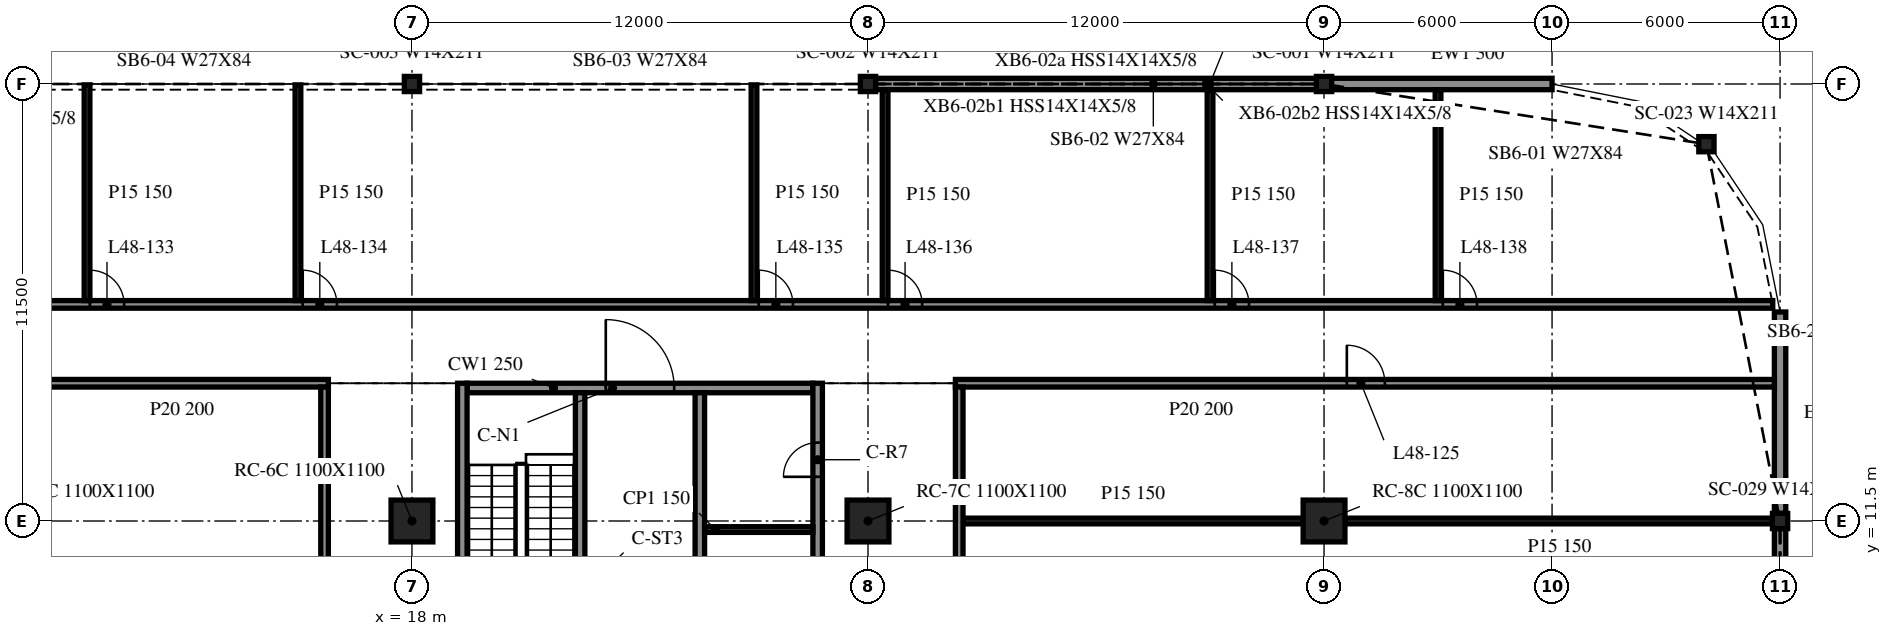
"""IFC4 building model, lengths in metres.
Left out: names, types, materials, properties, quantities, classifications, styles, units other than length and angle.
Written with IfcOpenShell. Run it as: python <this file> out.ifc"""

import sys

from ifc_helpers import new_model, si_unit, direction, frame, frame_2d, origin, origin_2d, place, context, subcontext, project, spatial, rectangle, i_section, extrude, element, fill, save


model = new_model("IFC4")
c1 = context("Model", 3, precision=1e-05, world=origin(), true_north=direction((0.0, 1.0)))
c2 = subcontext(c1, "Body", "Model", "MODEL_VIEW")
j1 = project(units=[si_unit("LENGTHUNIT", "METRE"), si_unit("PLANEANGLEUNIT", "RADIAN")], contexts=[c1])
p1 = place(None, origin())
s1 = spatial("IfcSite", under=j1, at=p1, CompositionType="ELEMENT")
p2 = place(p1, origin())
s2 = spatial("IfcBuilding", under=s1, at=p2, CompositionType="ELEMENT")
p3 = place(p2, frame((0.0, 0.0, 201.5)))
s3 = spatial("IfcBuildingStorey", under=s2, at=p3, CompositionType="ELEMENT", Elevation=201.5)
for number, where, z_axis, x_axis in (
    (1, (18.0, 11.5, -0.34), (0.0, 0.0, 1.0), (1.0, 0.0, 0.0)),
    (2, (30.0, 11.5, -0.34), (0.0, 0.0, 1.0), (1.0, 0.0, 0.0)),
    (3, (42.0, 11.5, -0.34), (0.0, 0.0, 1.0), (1.0, 0.0, 0.0)),
):
    element("IfcColumn", number, at=place(p3, frame(where, z_axis=z_axis, x_axis=x_axis)), inside=s3, PredefinedType="COLUMN", context=c2, shape_type="SweptSolid", body=[
        extrude(rectangle(XDim=1.1, YDim=1.1, at=origin_2d()), origin(), (0.0, 0.0, 1.0), 3.8),
    ])
for number, where, z_axis, x_axis in (
    (4, (52.062, 21.416, -0.34), (0.0, 0.0, 1.0), (1.0, 0.0, 0.0)),
    (5, (42.0, 23.0, -0.34), (0.0, 0.0, 1.0), (1.0, 0.0, 0.0)),
    (6, (30.0, 23.0, -0.34), (0.0, 0.0, 1.0), (1.0, 0.0, 0.0)),
    (7, (18.0, 23.0, -0.34), (0.0, 0.0, 1.0), (1.0, 0.0, 0.0)),
    (8, (54.0, 11.5, -0.34), (0.0, 0.0, 1.0), (1.0, 0.0, 0.0)),
):
    element("IfcColumn", number, at=place(p3, frame(where, z_axis=z_axis, x_axis=x_axis)), inside=s3, PredefinedType="COLUMN", context=c2, shape_type="SweptSolid", body=[
        extrude(i_section(OverallWidth=0.401, OverallDepth=0.399, WebThickness=0.025, FlangeThickness=0.04, at=origin_2d()), origin(), (0.0, 0.0, 1.0), 3.8),
    ])
p4 = place(p3, frame((48.0, 23.0, 0.0), z_axis=(0.0, 0.0, 1.0), x_axis=(-1.0, 0.0, 0.0)))
e9 = element("IfcWall", 9, at=p4, inside=s3, PredefinedType="NOTDEFINED", context=c2, shape_type="SweptSolid", body=[
    extrude(rectangle(XDim=5.988, YDim=0.3, at=frame_2d((2.994, 0.0))), origin(), (0.0, 0.0, 1.0), 2.782),
])
p5 = place(p3, frame((41.988, 23.0, 0.0), z_axis=(0.0, 0.0, 1.0), x_axis=(-1.0, 0.0, 0.0)))
e10 = element("IfcWall", 10, at=p5, inside=s3, PredefinedType="NOTDEFINED", context=c2, shape_type="SweptSolid", body=[
    extrude(rectangle(XDim=11.975, YDim=0.3, at=frame_2d((5.988, 0.0))), origin(), (0.0, 0.0, 1.0), 2.782),
])
p6 = place(p3, frame((54.0, 0.2, 0.0), z_axis=(0.0, 0.0, 1.0), x_axis=(0.0, 1.0, 0.0)))
e11 = element("IfcWall", 11, at=p6, inside=s3, PredefinedType="NOTDEFINED", context=c2, shape_type="SweptSolid", body=[
    extrude(rectangle(XDim=11.1, YDim=0.3, at=frame_2d((5.55, 0.0))), origin(), (0.0, 0.0, 1.0), 2.782),
])
p7 = place(p3, frame((54.0, 11.7, 0.0), z_axis=(0.0, 0.0, 1.0), x_axis=(0.0, 1.0, 0.0)))
e12 = element("IfcWall", 12, at=p7, inside=s3, PredefinedType="NOTDEFINED", context=c2, shape_type="SweptSolid", body=[
    extrude(rectangle(XDim=5.3, YDim=0.3, at=frame_2d((2.65, 0.0))), origin(), (0.0, 0.0, 1.0), 2.782),
])
p8 = place(p3, frame((19.325, 15.125, 0.0), z_axis=(0.0, 0.0, 1.0), x_axis=(0.0, -1.0, 0.0)))
e13 = element("IfcWall", 13, at=p8, inside=s3, PredefinedType="SOLIDWALL", context=c2, shape_type="SweptSolid", body=[
    extrude(rectangle(XDim=24.25, YDim=0.25, at=frame_2d((12.125, 0.0))), origin(), (0.0, 0.0, 1.0), 3.46),
])
p9 = place(p3, frame((28.675, -9.125, 0.0), z_axis=(0.0, 0.0, 1.0), x_axis=(0.0, 1.0, 0.0)))
e14 = element("IfcWall", 14, at=p9, inside=s3, PredefinedType="SOLIDWALL", context=c2, shape_type="SweptSolid", body=[
    extrude(rectangle(XDim=24.25, YDim=0.25, at=frame_2d((12.125, 0.0))), origin(), (0.0, 0.0, 1.0), 3.46),
])
p10 = place(p9, frame((13.075, 0.0, 0.0)))
e15 = element("IfcOpeningElement", 15, at=p10, cuts=e14, PredefinedType="OPENING", context=c2, shape_type="SweptSolid", body=[
    extrude(rectangle(XDim=0.9, YDim=2.1, at=frame_2d((0.45, 1.05))), frame((0.0, 0.135, 0.0), z_axis=(0.0, -1.0, 0.0), x_axis=(1.0, 0.0, 0.0)), (0.0, 0.0, 1.0), 0.27),
])
p11 = place(p9, frame((15.775, 0.0, 0.0)))
e16 = element("IfcOpeningElement", 16, at=p11, cuts=e14, PredefinedType="OPENING", context=c2, shape_type="SweptSolid", body=[
    extrude(rectangle(XDim=0.9, YDim=2.1, at=frame_2d((0.45, 1.05))), frame((0.0, 0.135, 0.0), z_axis=(0.0, -1.0, 0.0), x_axis=(1.0, 0.0, 0.0)), (0.0, 0.0, 1.0), 0.27),
])
p12 = place(p9, frame((18.712, 0.0, 0.0)))
e17 = element("IfcOpeningElement", 17, at=p12, cuts=e14, PredefinedType="OPENING", context=c2, shape_type="SweptSolid", body=[
    extrude(rectangle(XDim=0.9, YDim=2.1, at=frame_2d((0.45, 1.05))), frame((0.0, 0.135, 0.0), z_axis=(0.0, -1.0, 0.0), x_axis=(1.0, 0.0, 0.0)), (0.0, 0.0, 1.0), 0.27),
])
p13 = place(p9, frame((21.788, 0.0, 0.0)))
e18 = element("IfcOpeningElement", 18, at=p13, cuts=e14, PredefinedType="OPENING", context=c2, shape_type="SweptSolid", body=[
    extrude(rectangle(XDim=0.9, YDim=2.1, at=frame_2d((0.45, 1.05))), frame((0.0, 0.135, 0.0), z_axis=(0.0, -1.0, 0.0), x_axis=(1.0, 0.0, 0.0)), (0.0, 0.0, 1.0), 0.27),
])
p14 = place(p3, frame((19.45, 15.0, 0.0), z_axis=(0.0, 0.0, 1.0), x_axis=(1.0, 0.0, 0.0)))
e19 = element("IfcWall", 19, at=p14, inside=s3, PredefinedType="SOLIDWALL", context=c2, shape_type="SweptSolid", body=[
    extrude(rectangle(XDim=9.1, YDim=0.25, at=frame_2d((4.55, 0.0))), origin(), (0.0, 0.0, 1.0), 3.46),
])
p15 = place(p14, frame((3.65, 0.0, 0.0)))
e20 = element("IfcOpeningElement", 20, at=p15, cuts=e19, PredefinedType="OPENING", context=c2, shape_type="SweptSolid", body=[
    extrude(rectangle(XDim=1.8, YDim=2.1, at=frame_2d((0.9, 1.05))), frame((0.0, 0.135, 0.0), z_axis=(0.0, -1.0, 0.0), x_axis=(1.0, 0.0, 0.0)), (0.0, 0.0, 1.0), 0.27),
])
p16 = place(p3, frame((22.425, 14.875, 0.0), z_axis=(0.0, 0.0, 1.0), x_axis=(0.0, -1.0, 0.0)))
e21 = element("IfcWall", 21, at=p16, inside=s3, PredefinedType="SOLIDWALL", context=c2, shape_type="SweptSolid", body=[
    extrude(rectangle(XDim=6.25, YDim=0.25, at=frame_2d((3.125, 0.0))), origin(), (0.0, 0.0, 1.0), 3.46),
])
p17 = place(p16, frame((4.85, 0.0, 0.0)))
e22 = element("IfcOpeningElement", 22, at=p17, cuts=e21, PredefinedType="OPENING", context=c2, shape_type="SweptSolid", body=[
    extrude(rectangle(XDim=1.0, YDim=2.1, at=frame_2d((0.5, 1.05))), frame((0.0, 0.135, 0.0), z_axis=(0.0, -1.0, 0.0), x_axis=(1.0, 0.0, 0.0)), (0.0, 0.0, 1.0), 0.27),
])
p18 = place(p3, frame((25.575, 14.875, 0.0), z_axis=(0.0, 0.0, 1.0), x_axis=(0.0, -1.0, 0.0)))
e23 = element("IfcWall", 23, at=p18, inside=s3, PredefinedType="SOLIDWALL", context=c2, shape_type="SweptSolid", body=[
    extrude(rectangle(XDim=17.5, YDim=0.25, at=frame_2d((8.75, 0.0))), origin(), (0.0, 0.0, 1.0), 3.46),
])
p19 = place(p18, frame((15.45, 0.0, 0.0)))
e24 = element("IfcOpeningElement", 24, at=p19, cuts=e23, PredefinedType="OPENING", context=c2, shape_type="SweptSolid", body=[
    extrude(rectangle(XDim=1.1, YDim=2.1, at=frame_2d((0.55, 1.05))), frame((0.0, 0.135, 0.0), z_axis=(0.0, -1.0, 0.0), x_axis=(1.0, 0.0, 0.0)), (0.0, 0.0, 1.0), 0.27),
])
p20 = place(p18, frame((12.8, 0.0, 0.0)))
e25 = element("IfcOpeningElement", 25, at=p20, cuts=e23, PredefinedType="OPENING", context=c2, shape_type="SweptSolid", body=[
    extrude(rectangle(XDim=0.9, YDim=2.1, at=frame_2d((0.45, 1.05))), frame((0.0, 0.135, 0.0), z_axis=(0.0, -1.0, 0.0), x_axis=(1.0, 0.0, 0.0)), (0.0, 0.0, 1.0), 0.27),
])
p21 = place(p3, frame((25.7, 11.275, 0.0), z_axis=(0.0, 0.0, 1.0), x_axis=(1.0, 0.0, 0.0)))
e26 = element("IfcWall", 26, at=p21, inside=s3, PredefinedType="PARTITIONING", context=c2, shape_type="SweptSolid", body=[
    extrude(rectangle(XDim=2.85, YDim=0.15, at=frame_2d((1.425, 0.0))), origin(), (0.0, 0.0, 1.0), 3.46),
])
p22 = place(p3, frame((32.5, 11.5, 0.0), z_axis=(0.0, 0.0, 1.0), x_axis=(1.0, 0.0, 0.0)))
e27 = element("IfcWall", 27, at=p22, inside=s3, PredefinedType="PARTITIONING", context=c2, shape_type="SweptSolid", body=[
    extrude(rectangle(XDim=8.95, YDim=0.15, at=frame_2d((4.475, 0.0))), origin(), (0.0, 0.0, 1.0), 3.46),
])
p23 = place(p3, frame((42.55, 11.5, 0.0), z_axis=(0.0, 0.0, 1.0), x_axis=(1.0, 0.0, 0.0)))
e28 = element("IfcWall", 28, at=p23, inside=s3, PredefinedType="PARTITIONING", context=c2, shape_type="SweptSolid", body=[
    extrude(rectangle(XDim=11.3, YDim=0.15, at=frame_2d((5.65, 0.0))), origin(), (0.0, 0.0, 1.0), 3.46),
])
p24 = place(p3, frame((8.1, 15.125, 0.0), z_axis=(0.0, 0.0, 1.0), x_axis=(1.0, 0.0, 0.0)))
e29 = element("IfcWall", 29, at=p24, inside=s3, PredefinedType="PARTITIONING", context=c2, shape_type="SweptSolid", body=[
    extrude(rectangle(XDim=7.7, YDim=0.2, at=frame_2d((3.85, 0.0))), origin(), (0.0, 0.0, 1.0), 3.46),
])
p25 = place(p3, frame((32.3, 15.125, 0.0), z_axis=(0.0, 0.0, 1.0), x_axis=(1.0, 0.0, 0.0)))
e30 = element("IfcWall", 30, at=p25, inside=s3, PredefinedType="PARTITIONING", context=c2, shape_type="SweptSolid", body=[
    extrude(rectangle(XDim=21.55, YDim=0.2, at=frame_2d((10.775, 0.0))), origin(), (0.0, 0.0, 1.0), 3.46),
])
p26 = place(p25, frame((10.3, 0.0, 0.0)))
e31 = element("IfcOpeningElement", 31, at=p26, cuts=e30, PredefinedType="OPENING", context=c2, shape_type="SweptSolid", body=[
    extrude(rectangle(XDim=1.0, YDim=2.1, at=frame_2d((0.5, 1.05))), frame((0.0, 0.11, 0.0), z_axis=(0.0, -1.0, 0.0), x_axis=(1.0, 0.0, 0.0)), (0.0, 0.0, 1.0), 0.22),
])
p27 = place(p3, frame((-41.975, 17.2, 0.0), z_axis=(0.0, 0.0, 1.0), x_axis=(1.0, 0.0, 0.0)))
e32 = element("IfcWall", 32, at=p27, inside=s3, PredefinedType="PARTITIONING", context=c2, shape_type="SweptSolid", body=[
    extrude(rectangle(XDim=95.782, YDim=0.2, at=frame_2d((47.891, 0.0))), origin(), (0.0, 0.0, 1.0), 3.46),
])
p28 = place(p27, frame((7.7, 0.0, 0.0)))
e33 = element("IfcOpeningElement", 33, at=p28, cuts=e32, PredefinedType="OPENING", context=c2, shape_type="SweptSolid", body=[
    extrude(rectangle(XDim=0.9, YDim=2.1, at=frame_2d((0.45, 1.05))), frame((0.0, 0.11, 0.0), z_axis=(0.0, -1.0, 0.0), x_axis=(1.0, 0.0, 0.0)), (0.0, 0.0, 1.0), 0.22),
])
p29 = place(p27, frame((13.7, 0.0, 0.0)))
e34 = element("IfcOpeningElement", 34, at=p29, cuts=e32, PredefinedType="OPENING", context=c2, shape_type="SweptSolid", body=[
    extrude(rectangle(XDim=0.9, YDim=2.1, at=frame_2d((0.45, 1.05))), frame((0.0, 0.11, 0.0), z_axis=(0.0, -1.0, 0.0), x_axis=(1.0, 0.0, 0.0)), (0.0, 0.0, 1.0), 0.22),
])
p30 = place(p27, frame((19.7, 0.0, 0.0)))
e35 = element("IfcOpeningElement", 35, at=p30, cuts=e32, PredefinedType="OPENING", context=c2, shape_type="SweptSolid", body=[
    extrude(rectangle(XDim=0.9, YDim=2.1, at=frame_2d((0.45, 1.05))), frame((0.0, 0.11, 0.0), z_axis=(0.0, -1.0, 0.0), x_axis=(1.0, 0.0, 0.0)), (0.0, 0.0, 1.0), 0.22),
])
p31 = place(p27, frame((31.7, 0.0, 0.0)))
e36 = element("IfcOpeningElement", 36, at=p31, cuts=e32, PredefinedType="OPENING", context=c2, shape_type="SweptSolid", body=[
    extrude(rectangle(XDim=0.9, YDim=2.1, at=frame_2d((0.45, 1.05))), frame((0.0, 0.11, 0.0), z_axis=(0.0, -1.0, 0.0), x_axis=(1.0, 0.0, 0.0)), (0.0, 0.0, 1.0), 0.22),
])
p32 = place(p27, frame((35.1, 0.0, 0.0)))
e37 = element("IfcOpeningElement", 37, at=p32, cuts=e32, PredefinedType="OPENING", context=c2, shape_type="SweptSolid", body=[
    extrude(rectangle(XDim=0.9, YDim=2.1, at=frame_2d((0.45, 1.05))), frame((0.0, 0.11, 0.0), z_axis=(0.0, -1.0, 0.0), x_axis=(1.0, 0.0, 0.0)), (0.0, 0.0, 1.0), 0.22),
])
p33 = place(p27, frame((43.7, 0.0, 0.0)))
e38 = element("IfcOpeningElement", 38, at=p33, cuts=e32, PredefinedType="OPENING", context=c2, shape_type="SweptSolid", body=[
    extrude(rectangle(XDim=0.9, YDim=2.1, at=frame_2d((0.45, 1.05))), frame((0.0, 0.11, 0.0), z_axis=(0.0, -1.0, 0.0), x_axis=(1.0, 0.0, 0.0)), (0.0, 0.0, 1.0), 0.22),
])
p34 = place(p27, frame((47.3, 0.0, 0.0)))
e39 = element("IfcOpeningElement", 39, at=p34, cuts=e32, PredefinedType="OPENING", context=c2, shape_type="SweptSolid", body=[
    extrude(rectangle(XDim=0.9, YDim=2.1, at=frame_2d((0.45, 1.05))), frame((0.0, 0.11, 0.0), z_axis=(0.0, -1.0, 0.0), x_axis=(1.0, 0.0, 0.0)), (0.0, 0.0, 1.0), 0.22),
])
p35 = place(p27, frame((51.5, 0.0, 0.0)))
e40 = element("IfcOpeningElement", 40, at=p35, cuts=e32, PredefinedType="OPENING", context=c2, shape_type="SweptSolid", body=[
    extrude(rectangle(XDim=0.9, YDim=2.1, at=frame_2d((0.45, 1.05))), frame((0.0, 0.11, 0.0), z_axis=(0.0, -1.0, 0.0), x_axis=(1.0, 0.0, 0.0)), (0.0, 0.0, 1.0), 0.22),
])
p36 = place(p27, frame((57.1, 0.0, 0.0)))
e41 = element("IfcOpeningElement", 41, at=p36, cuts=e32, PredefinedType="OPENING", context=c2, shape_type="SweptSolid", body=[
    extrude(rectangle(XDim=0.9, YDim=2.1, at=frame_2d((0.45, 1.05))), frame((0.0, 0.11, 0.0), z_axis=(0.0, -1.0, 0.0), x_axis=(1.0, 0.0, 0.0)), (0.0, 0.0, 1.0), 0.22),
])
p37 = place(p27, frame((69.1, 0.0, 0.0)))
e42 = element("IfcOpeningElement", 42, at=p37, cuts=e32, PredefinedType="OPENING", context=c2, shape_type="SweptSolid", body=[
    extrude(rectangle(XDim=0.9, YDim=2.1, at=frame_2d((0.45, 1.05))), frame((0.0, 0.11, 0.0), z_axis=(0.0, -1.0, 0.0), x_axis=(1.0, 0.0, 0.0)), (0.0, 0.0, 1.0), 0.22),
])
p38 = place(p27, frame((72.5, 0.0, 0.0)))
e43 = element("IfcOpeningElement", 43, at=p38, cuts=e32, PredefinedType="OPENING", context=c2, shape_type="SweptSolid", body=[
    extrude(rectangle(XDim=0.9, YDim=2.1, at=frame_2d((0.45, 1.05))), frame((0.0, 0.11, 0.0), z_axis=(0.0, -1.0, 0.0), x_axis=(1.0, 0.0, 0.0)), (0.0, 0.0, 1.0), 0.22),
])
p39 = place(p27, frame((81.1, 0.0, 0.0)))
e44 = element("IfcOpeningElement", 44, at=p39, cuts=e32, PredefinedType="OPENING", context=c2, shape_type="SweptSolid", body=[
    extrude(rectangle(XDim=0.9, YDim=2.1, at=frame_2d((0.45, 1.05))), frame((0.0, 0.11, 0.0), z_axis=(0.0, -1.0, 0.0), x_axis=(1.0, 0.0, 0.0)), (0.0, 0.0, 1.0), 0.22),
])
p40 = place(p27, frame((87.1, 0.0, 0.0)))
e45 = element("IfcOpeningElement", 45, at=p40, cuts=e32, PredefinedType="OPENING", context=c2, shape_type="SweptSolid", body=[
    extrude(rectangle(XDim=0.9, YDim=2.1, at=frame_2d((0.45, 1.05))), frame((0.0, 0.11, 0.0), z_axis=(0.0, -1.0, 0.0), x_axis=(1.0, 0.0, 0.0)), (0.0, 0.0, 1.0), 0.22),
])
for number, where, z_axis, x_axis in (
    (46, (9.45, 17.3, 0.0), (0.0, 0.0, 1.0), (0.0, 1.0, 0.0)),
    (47, (15.0, 17.3, 0.0), (0.0, 0.0, 1.0), (0.0, 1.0, 0.0)),
):
    element("IfcWall", number, at=place(p3, frame(where, z_axis=z_axis, x_axis=x_axis)), inside=s3, PredefinedType="PARTITIONING", context=c2, shape_type="SweptSolid", body=[
        extrude(rectangle(XDim=5.675, YDim=0.15, at=frame_2d((2.837, 0.0))), origin(), (0.0, 0.0, 1.0), 3.46),
    ])
p41 = place(p3, frame((15.7, -9.025, 0.0), z_axis=(0.0, 0.0, 1.0), x_axis=(0.0, 1.0, 0.0)))
e48 = element("IfcWall", 48, at=p41, inside=s3, PredefinedType="PARTITIONING", context=c2, shape_type="SweptSolid", body=[
    extrude(rectangle(XDim=24.05, YDim=0.2, at=frame_2d((12.025, 0.0))), origin(), (0.0, 0.0, 1.0), 3.46),
])
p42 = place(p3, frame((27.0, 17.3, 0.0), z_axis=(0.0, 0.0, 1.0), x_axis=(0.0, 1.0, 0.0)))
e49 = element("IfcWall", 49, at=p42, inside=s3, PredefinedType="PARTITIONING", context=c2, shape_type="SweptSolid", body=[
    extrude(rectangle(XDim=5.675, YDim=0.15, at=frame_2d((2.837, 0.0))), origin(), (0.0, 0.0, 1.0), 3.46),
])
p43 = place(p3, frame((30.45, 17.3, 0.0), z_axis=(0.0, 0.0, 1.0), x_axis=(0.0, 1.0, 0.0)))
e50 = element("IfcWall", 50, at=p43, inside=s3, PredefinedType="PARTITIONING", context=c2, shape_type="SweptSolid", body=[
    extrude(rectangle(XDim=5.55, YDim=0.15, at=frame_2d((2.775, 0.0))), origin(), (0.0, 0.0, 1.0), 3.46),
])
p44 = place(p3, frame((32.4, -9.025, 0.0), z_axis=(0.0, 0.0, 1.0), x_axis=(0.0, 1.0, 0.0)))
e51 = element("IfcWall", 51, at=p44, inside=s3, PredefinedType="PARTITIONING", context=c2, shape_type="SweptSolid", body=[
    extrude(rectangle(XDim=24.05, YDim=0.2, at=frame_2d((12.025, 0.0))), origin(), (0.0, 0.0, 1.0), 3.46),
])
p45 = place(p44, frame((11.5, 0.0, 0.0)))
e52 = element("IfcOpeningElement", 52, at=p45, cuts=e51, PredefinedType="OPENING", context=c2, shape_type="SweptSolid", body=[
    extrude(rectangle(XDim=1.0, YDim=2.1, at=frame_2d((0.5, 1.05))), frame((0.0, 0.11, 0.0), z_axis=(0.0, -1.0, 0.0), x_axis=(1.0, 0.0, 0.0)), (0.0, 0.0, 1.0), 0.22),
])
for number, where, z_axis, x_axis in (
    (53, (39.0, 17.3, 0.0), (0.0, 0.0, 1.0), (0.0, 1.0, 0.0)),
    (54, (45.0, 17.3, 0.0), (0.0, 0.0, 1.0), (0.0, 1.0, 0.0)),
):
    element("IfcWall", number, at=place(p3, frame(where, z_axis=z_axis, x_axis=x_axis)), inside=s3, PredefinedType="PARTITIONING", context=c2, shape_type="SweptSolid", body=[
        extrude(rectangle(XDim=5.55, YDim=0.15, at=frame_2d((2.775, 0.0))), origin(), (0.0, 0.0, 1.0), 3.46),
    ])
p46 = place(p15, origin())
e55 = element("IfcDoor", 55, at=p46, inside=s3, OperationType="DOUBLE_DOOR_SINGLE_SWING", PredefinedType="DOOR", context=c2, shape_type="SweptSolid", body=[
    extrude(rectangle(XDim=1.8, YDim=2.1, at=frame_2d((0.9, 1.05))), frame((0.0, 0.025, 0.0), z_axis=(0.0, -1.0, 0.0), x_axis=(1.0, 0.0, 0.0)), (0.0, 0.0, 1.0), 0.05),
])
fill(e20, e55)
p47 = place(p13, origin())
e56 = element("IfcDoor", 56, at=p47, inside=s3, OperationType="SINGLE_SWING_LEFT", PredefinedType="DOOR", context=c2, shape_type="SweptSolid", body=[
    extrude(rectangle(XDim=0.9, YDim=2.1, at=frame_2d((0.45, 1.05))), frame((0.0, 0.025, 0.0), z_axis=(0.0, -1.0, 0.0), x_axis=(1.0, 0.0, 0.0)), (0.0, 0.0, 1.0), 0.05),
])
fill(e18, e56)
p48 = place(p26, origin())
e57 = element("IfcDoor", 57, at=p48, inside=s3, OperationType="SINGLE_SWING_LEFT", PredefinedType="DOOR", context=c2, shape_type="SweptSolid", body=[
    extrude(rectangle(XDim=1.0, YDim=2.1, at=frame_2d((0.5, 1.05))), frame((0.0, 0.025, 0.0), z_axis=(0.0, -1.0, 0.0), x_axis=(1.0, 0.0, 0.0)), (0.0, 0.0, 1.0), 0.05),
])
fill(e31, e57)
p49 = place(p35, origin())
e58 = element("IfcDoor", 58, at=p49, inside=s3, OperationType="SINGLE_SWING_RIGHT", PredefinedType="DOOR", context=c2, shape_type="SweptSolid", body=[
    extrude(rectangle(XDim=0.9, YDim=2.1, at=frame_2d((0.45, 1.05))), frame((0.0, 0.025, 0.0), z_axis=(0.0, -1.0, 0.0), x_axis=(1.0, 0.0, 0.0)), (0.0, 0.0, 1.0), 0.05),
])
fill(e40, e58)
p50 = place(p36, origin())
e59 = element("IfcDoor", 59, at=p50, inside=s3, OperationType="SINGLE_SWING_RIGHT", PredefinedType="DOOR", context=c2, shape_type="SweptSolid", body=[
    extrude(rectangle(XDim=0.9, YDim=2.1, at=frame_2d((0.45, 1.05))), frame((0.0, 0.025, 0.0), z_axis=(0.0, -1.0, 0.0), x_axis=(1.0, 0.0, 0.0)), (0.0, 0.0, 1.0), 0.05),
])
fill(e41, e59)
p51 = place(p37, origin())
e60 = element("IfcDoor", 60, at=p51, inside=s3, OperationType="SINGLE_SWING_RIGHT", PredefinedType="DOOR", context=c2, shape_type="SweptSolid", body=[
    extrude(rectangle(XDim=0.9, YDim=2.1, at=frame_2d((0.45, 1.05))), frame((0.0, 0.025, 0.0), z_axis=(0.0, -1.0, 0.0), x_axis=(1.0, 0.0, 0.0)), (0.0, 0.0, 1.0), 0.05),
])
fill(e42, e60)
p52 = place(p38, origin())
e61 = element("IfcDoor", 61, at=p52, inside=s3, OperationType="SINGLE_SWING_RIGHT", PredefinedType="DOOR", context=c2, shape_type="SweptSolid", body=[
    extrude(rectangle(XDim=0.9, YDim=2.1, at=frame_2d((0.45, 1.05))), frame((0.0, 0.025, 0.0), z_axis=(0.0, -1.0, 0.0), x_axis=(1.0, 0.0, 0.0)), (0.0, 0.0, 1.0), 0.05),
])
fill(e43, e61)
p53 = place(p39, origin())
e62 = element("IfcDoor", 62, at=p53, inside=s3, OperationType="SINGLE_SWING_RIGHT", PredefinedType="DOOR", context=c2, shape_type="SweptSolid", body=[
    extrude(rectangle(XDim=0.9, YDim=2.1, at=frame_2d((0.45, 1.05))), frame((0.0, 0.025, 0.0), z_axis=(0.0, -1.0, 0.0), x_axis=(1.0, 0.0, 0.0)), (0.0, 0.0, 1.0), 0.05),
])
fill(e44, e62)
p54 = place(p40, origin())
e63 = element("IfcDoor", 63, at=p54, inside=s3, OperationType="SINGLE_SWING_RIGHT", PredefinedType="DOOR", context=c2, shape_type="SweptSolid", body=[
    extrude(rectangle(XDim=0.9, YDim=2.1, at=frame_2d((0.45, 1.05))), frame((0.0, 0.025, 0.0), z_axis=(0.0, -1.0, 0.0), x_axis=(1.0, 0.0, 0.0)), (0.0, 0.0, 1.0), 0.05),
])
fill(e45, e63)
save(model, sys.argv[1])
